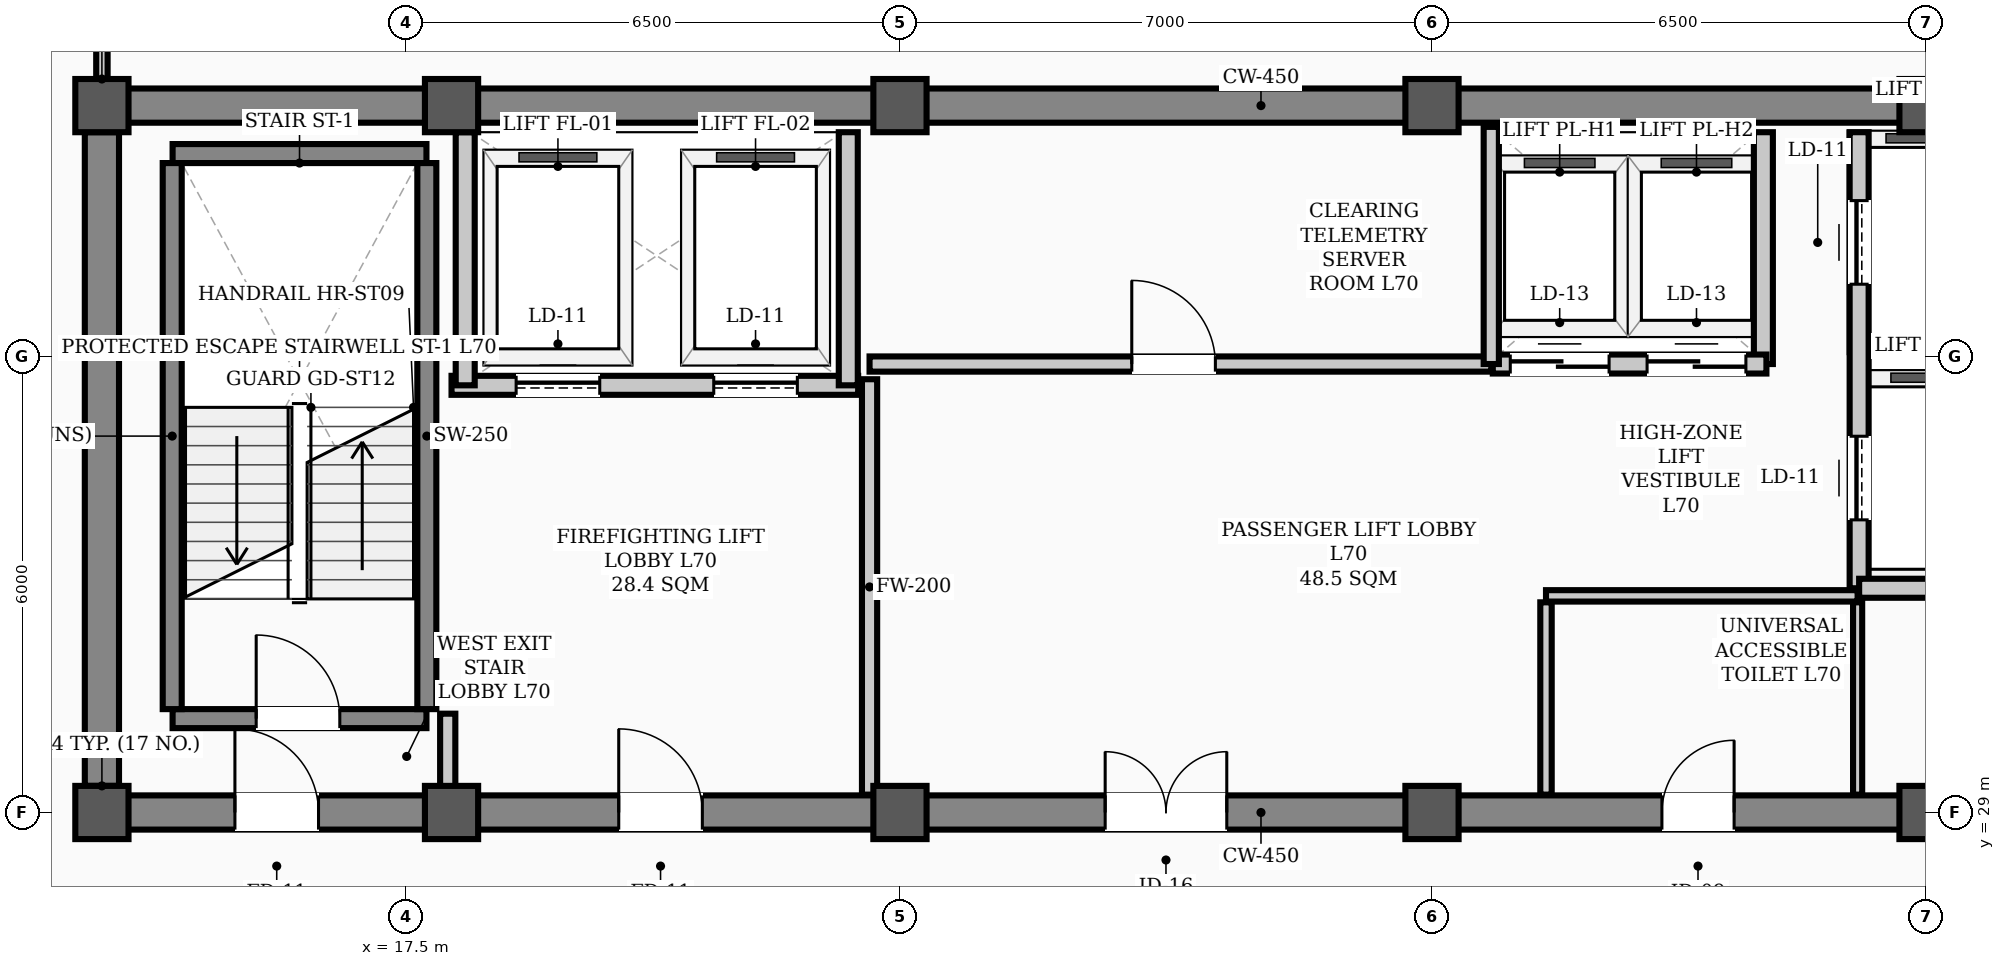
"""IFC4 building model, lengths in metres.
Left out: names, types, materials, properties, quantities, classifications, styles, units other than length and angle.
Written with IfcOpenShell. Run it as: python <this file> out.ifc"""

import sys

from ifc_helpers import new_model, si_unit, direction, frame, frame_2d, origin, origin_2d, place, context, subcontext, project, spatial, rectangle, hollow_rectangle, extrude, element, fill, save


model = new_model("IFC4")
c1 = context("Model", 3, precision=1e-05, world=origin(), true_north=direction((0.0, 1.0)))
c2 = subcontext(c1, "Body", "Model", "MODEL_VIEW")
j1 = project(units=[si_unit("LENGTHUNIT", "METRE"), si_unit("PLANEANGLEUNIT", "RADIAN")], contexts=[c1])
p1 = place(None, origin())
s1 = spatial("IfcSite", under=j1, at=p1, CompositionType="ELEMENT")
p2 = place(p1, origin())
s2 = spatial("IfcBuilding", under=s1, at=p2, CompositionType="ELEMENT")
p3 = place(p2, frame((0.0, 0.0, 281.3)))
s3 = spatial("IfcBuildingStorey", under=s2, at=p3, CompositionType="ELEMENT", Elevation=281.3)
for number, where, z_axis, x_axis in (
    (1, (13.5, 29.0, 0.0), (0.0, 0.0, 1.0), (1.0, 0.0, 0.0)),
    (2, (13.5, 38.3, 0.0), (0.0, 0.0, 1.0), (1.0, 0.0, 0.0)),
    (3, (18.1, 29.0, 0.0), (0.0, 0.0, 1.0), (1.0, 0.0, 0.0)),
    (4, (18.1, 38.3, 0.0), (0.0, 0.0, 1.0), (1.0, 0.0, 0.0)),
    (5, (24.0, 29.0, 0.0), (0.0, 0.0, 1.0), (1.0, 0.0, 0.0)),
    (6, (24.0, 38.3, 0.0), (0.0, 0.0, 1.0), (1.0, 0.0, 0.0)),
    (7, (31.0, 29.0, 0.0), (0.0, 0.0, 1.0), (1.0, 0.0, 0.0)),
    (8, (31.0, 38.3, 0.0), (0.0, 0.0, 1.0), (1.0, 0.0, 0.0)),
    (9, (37.5, 29.0, 0.0), (0.0, 0.0, 1.0), (1.0, 0.0, 0.0)),
    (10, (37.5, 38.3, 0.0), (0.0, 0.0, 1.0), (1.0, 0.0, 0.0)),
):
    element("IfcColumn", number, at=place(p3, frame(where, z_axis=z_axis, x_axis=x_axis)), inside=s3, PredefinedType="COLUMN", context=c2, shape_type="SweptSolid", body=[
        extrude(hollow_rectangle(XDim=0.7, YDim=0.7, WallThickness=0.028, InnerFilletRadius=0.014, OuterFilletRadius=0.042, at=origin_2d()), origin(), (0.0, 0.0, 1.0), 3.9),
    ])
p4 = place(p3, frame((13.5, 29.0, 0.0), z_axis=(0.0, 0.0, 1.0), x_axis=(1.0, 0.0, 0.0)))
e11 = element("IfcWall", 11, at=p4, inside=s3, PredefinedType="SHEAR", context=c2, shape_type="SweptSolid", body=[
    extrude(rectangle(XDim=30.5, YDim=0.45, at=frame_2d((15.25, 0.0))), origin(), (0.0, 0.0, 1.0), 3.72),
])
p5 = place(p4, frame((1.75, 0.0, 0.0)))
e12 = element("IfcOpeningElement", 12, at=p5, cuts=e11, PredefinedType="OPENING", context=c2, shape_type="SweptSolid", body=[
    extrude(rectangle(XDim=1.1, YDim=2.08, at=frame_2d((0.55, 1.04))), frame((0.0, 0.235, 0.0), z_axis=(0.0, -1.0, 0.0), x_axis=(1.0, 0.0, 0.0)), (0.0, 0.0, 1.0), 0.47),
])
p6 = place(p4, frame((26.7, 0.0, 0.0)))
e13 = element("IfcOpeningElement", 13, at=p6, cuts=e11, PredefinedType="OPENING", context=c2, shape_type="SweptSolid", body=[
    extrude(rectangle(XDim=1.1, YDim=2.08, at=frame_2d((0.55, 1.04))), frame((0.0, 0.235, 0.0), z_axis=(0.0, -1.0, 0.0), x_axis=(1.0, 0.0, 0.0)), (0.0, 0.0, 1.0), 0.47),
])
p7 = place(p4, frame((6.8, 0.0, 0.0)))
e14 = element("IfcOpeningElement", 14, at=p7, cuts=e11, PredefinedType="OPENING", context=c2, shape_type="SweptSolid", body=[
    extrude(rectangle(XDim=1.1, YDim=2.08, at=frame_2d((0.55, 1.04))), frame((0.0, 0.235, 0.0), z_axis=(0.0, -1.0, 0.0), x_axis=(1.0, 0.0, 0.0)), (0.0, 0.0, 1.0), 0.47),
])
p8 = place(p4, frame((13.2, 0.0, 0.0)))
e15 = element("IfcOpeningElement", 15, at=p8, cuts=e11, PredefinedType="OPENING", context=c2, shape_type="SweptSolid", body=[
    extrude(rectangle(XDim=1.6, YDim=2.08, at=frame_2d((0.8, 1.04))), frame((0.0, 0.235, 0.0), z_axis=(0.0, -1.0, 0.0), x_axis=(1.0, 0.0, 0.0)), (0.0, 0.0, 1.0), 0.47),
])
p9 = place(p4, frame((20.525, 0.0, 0.0)))
e16 = element("IfcOpeningElement", 16, at=p9, cuts=e11, PredefinedType="OPENING", context=c2, shape_type="SweptSolid", body=[
    extrude(rectangle(XDim=0.95, YDim=2.08, at=frame_2d((0.475, 1.04))), frame((0.0, 0.235, 0.0), z_axis=(0.0, -1.0, 0.0), x_axis=(1.0, 0.0, 0.0)), (0.0, 0.0, 1.0), 0.47),
])
p10 = place(p3, frame((13.5, 38.3, 0.0), z_axis=(0.0, 0.0, 1.0), x_axis=(1.0, 0.0, 0.0)))
e17 = element("IfcWall", 17, at=p10, inside=s3, PredefinedType="SHEAR", context=c2, shape_type="SweptSolid", body=[
    extrude(rectangle(XDim=30.5, YDim=0.45, at=frame_2d((15.25, 0.0))), origin(), (0.0, 0.0, 1.0), 3.72),
])
p11 = place(p3, frame((13.5, 29.35, 0.0), z_axis=(0.0, 0.0, 1.0), x_axis=(0.0, 1.0, 0.0)))
e18 = element("IfcWall", 18, at=p11, inside=s3, PredefinedType="SHEAR", context=c2, shape_type="SweptSolid", body=[
    extrude(rectangle(XDim=8.6, YDim=0.45, at=frame_2d((4.3, 0.0))), origin(), (0.0, 0.0, 1.0), 3.72),
])
p12 = place(p3, frame((14.43, 30.235, 0.0), z_axis=(0.0, 0.0, 1.0), x_axis=(1.0, 0.0, 0.0)))
e19 = element("IfcWall", 19, at=p12, inside=s3, PredefinedType="STANDARD", context=c2, shape_type="SweptSolid", body=[
    extrude(rectangle(XDim=3.34, YDim=0.25, at=frame_2d((1.67, 0.0))), origin(), (0.0, 0.0, 1.0), 3.72),
])
p13 = place(p12, frame((1.1, 0.0, 0.0)))
e20 = element("IfcOpeningElement", 20, at=p13, cuts=e19, PredefinedType="OPENING", context=c2, shape_type="SweptSolid", body=[
    extrude(rectangle(XDim=1.1, YDim=2.08, at=frame_2d((0.55, 1.04))), frame((0.0, 0.135, 0.0), z_axis=(0.0, -1.0, 0.0), x_axis=(1.0, 0.0, 0.0)), (0.0, 0.0, 1.0), 0.27),
])
p14 = place(p3, frame((14.43, 37.669, 0.0), z_axis=(0.0, 0.0, 1.0), x_axis=(1.0, 0.0, 0.0)))
e21 = element("IfcWall", 21, at=p14, inside=s3, PredefinedType="STANDARD", context=c2, shape_type="SweptSolid", body=[
    extrude(rectangle(XDim=3.34, YDim=0.25, at=frame_2d((1.67, 0.0))), origin(), (0.0, 0.0, 1.0), 3.72),
])
for number, where, z_axis, x_axis in (
    (22, (14.425, 30.36, 0.0), (0.0, 0.0, 1.0), (0.0, 1.0, 0.0)),
    (23, (17.775, 30.36, 0.0), (0.0, 0.0, 1.0), (0.0, 1.0, 0.0)),
):
    element("IfcWall", number, at=place(p3, frame(where, z_axis=z_axis, x_axis=x_axis)), inside=s3, PredefinedType="STANDARD", context=c2, shape_type="SweptSolid", body=[
        extrude(rectangle(XDim=7.184, YDim=0.25, at=frame_2d((3.592, 0.0))), origin(), (0.0, 0.0, 1.0), 3.72),
    ])
p15 = place(p3, frame((18.1, 34.62, 0.0), z_axis=(0.0, 0.0, 1.0), x_axis=(1.0, 0.0, 0.0)))
e24 = element("IfcWall", 24, at=p15, inside=s3, PredefinedType="STANDARD", context=c2, shape_type="SweptSolid", body=[
    extrude(rectangle(XDim=5.35, YDim=0.25, at=frame_2d((2.675, 0.0))), origin(), (0.0, 0.0, 1.0), 3.72),
])
p16 = place(p15, frame((0.85, 0.0, 0.0)))
e25 = element("IfcOpeningElement", 25, at=p16, cuts=e24, PredefinedType="OPENING", context=c2, shape_type="SweptSolid", body=[
    extrude(rectangle(XDim=1.1, YDim=2.08, at=frame_2d((0.55, 1.04))), frame((0.0, 0.135, 0.0), z_axis=(0.0, -1.0, 0.0), x_axis=(1.0, 0.0, 0.0)), (0.0, 0.0, 1.0), 0.27),
])
p17 = place(p15, frame((3.45, 0.0, 0.0)))
e26 = element("IfcOpeningElement", 26, at=p17, cuts=e24, PredefinedType="OPENING", context=c2, shape_type="SweptSolid", body=[
    extrude(rectangle(XDim=1.1, YDim=2.08, at=frame_2d((0.55, 1.04))), frame((0.0, 0.135, 0.0), z_axis=(0.0, -1.0, 0.0), x_axis=(1.0, 0.0, 0.0)), (0.0, 0.0, 1.0), 0.27),
])
p18 = place(p3, frame((36.62, 31.95, 0.0), z_axis=(0.0, 0.0, 1.0), x_axis=(0.0, 1.0, 0.0)))
e27 = element("IfcWall", 27, at=p18, inside=s3, PredefinedType="STANDARD", context=c2, shape_type="SweptSolid", body=[
    extrude(rectangle(XDim=6.0, YDim=0.25, at=frame_2d((3.0, 0.0))), origin(), (0.0, 0.0, 1.0), 3.4),
])
p19 = place(p18, frame((0.9, 0.0, 0.0)))
e28 = element("IfcOpeningElement", 28, at=p19, cuts=e27, PredefinedType="OPENING", context=c2, shape_type="SweptSolid", body=[
    extrude(rectangle(XDim=1.1, YDim=2.08, at=frame_2d((0.55, 1.04))), frame((0.0, 0.135, 0.0), z_axis=(0.0, -1.0, 0.0), x_axis=(1.0, 0.0, 0.0)), (0.0, 0.0, 1.0), 0.27),
])
p20 = place(p18, frame((4.0, 0.0, 0.0)))
e29 = element("IfcOpeningElement", 29, at=p20, cuts=e27, PredefinedType="OPENING", context=c2, shape_type="SweptSolid", body=[
    extrude(rectangle(XDim=1.1, YDim=2.08, at=frame_2d((0.55, 1.04))), frame((0.0, 0.135, 0.0), z_axis=(0.0, -1.0, 0.0), x_axis=(1.0, 0.0, 0.0)), (0.0, 0.0, 1.0), 0.27),
])
p21 = place(p3, frame((36.62, 31.95, 0.0), z_axis=(0.0, 0.0, 1.0), x_axis=(1.0, 0.0, 0.0)))
e30 = element("IfcWall", 30, at=p21, inside=s3, PredefinedType="STANDARD", context=c2, shape_type="SweptSolid", body=[
    extrude(rectangle(XDim=1.9, YDim=0.25, at=frame_2d((0.95, 0.0))), origin(), (0.0, 0.0, 1.0), 3.48),
])
for number, where, z_axis, x_axis in (
    (31, (18.28, 34.62, 0.0), (0.0, 0.0, 1.0), (0.0, 1.0, 0.0)),
    (32, (23.32, 34.62, 0.0), (0.0, 0.0, 1.0), (0.0, 1.0, 0.0)),
):
    element("IfcWall", number, at=place(p3, frame(where, z_axis=z_axis, x_axis=x_axis)), inside=s3, PredefinedType="STANDARD", context=c2, shape_type="SweptSolid", body=[
        extrude(rectangle(XDim=3.33, YDim=0.25, at=frame_2d((1.665, 0.0))), origin(), (0.0, 0.0, 1.0), 3.72),
    ])
p22 = place(p3, frame((35.36, 34.9, 0.0), z_axis=(0.0, 0.0, 1.0), x_axis=(0.0, 1.0, 0.0)))
e33 = element("IfcWall", 33, at=p22, inside=s3, PredefinedType="STANDARD", context=c2, shape_type="SweptSolid", body=[
    extrude(rectangle(XDim=3.05, YDim=0.25, at=frame_2d((1.525, 0.0))), origin(), (0.0, 0.0, 1.0), 3.4),
])
p23 = place(p3, frame((31.8, 34.9, 0.0), z_axis=(0.0, 0.0, 1.0), x_axis=(1.0, 0.0, 0.0)))
e34 = element("IfcWall", 34, at=p23, inside=s3, PredefinedType="STANDARD", context=c2, shape_type="SweptSolid", body=[
    extrude(rectangle(XDim=3.6, YDim=0.25, at=frame_2d((1.8, 0.0))), origin(), (0.0, 0.0, 1.0), 3.72),
])
p24 = place(p23, frame((0.23, 0.0, 0.0)))
e35 = element("IfcOpeningElement", 35, at=p24, cuts=e34, PredefinedType="OPENING", context=c2, shape_type="SweptSolid", body=[
    extrude(rectangle(XDim=1.3, YDim=2.08, at=frame_2d((0.65, 1.04))), frame((0.0, 0.135, 0.0), z_axis=(0.0, -1.0, 0.0), x_axis=(1.0, 0.0, 0.0)), (0.0, 0.0, 1.0), 0.27),
])
p25 = place(p23, frame((2.03, 0.0, 0.0)))
e36 = element("IfcOpeningElement", 36, at=p25, cuts=e34, PredefinedType="OPENING", context=c2, shape_type="SweptSolid", body=[
    extrude(rectangle(XDim=1.3, YDim=2.08, at=frame_2d((0.65, 1.04))), frame((0.0, 0.135, 0.0), z_axis=(0.0, -1.0, 0.0), x_axis=(1.0, 0.0, 0.0)), (0.0, 0.0, 1.0), 0.27),
])
p26 = place(p3, frame((23.6, 34.9, 0.0), z_axis=(0.0, 0.0, 1.0), x_axis=(1.0, 0.0, 0.0)))
e37 = element("IfcWall", 37, at=p26, inside=s3, PredefinedType="STANDARD", context=c2, shape_type="SweptSolid", body=[
    extrude(rectangle(XDim=8.18, YDim=0.2, at=frame_2d((4.09, 0.0))), origin(), (0.0, 0.0, 1.0), 3.72),
])
p27 = place(p26, frame((3.45, 0.0, 0.0)))
e38 = element("IfcOpeningElement", 38, at=p27, cuts=e37, PredefinedType="OPENING", context=c2, shape_type="SweptSolid", body=[
    extrude(rectangle(XDim=1.1, YDim=2.08, at=frame_2d((0.55, 1.04))), frame((0.0, 0.11, 0.0), z_axis=(0.0, -1.0, 0.0), x_axis=(1.0, 0.0, 0.0)), (0.0, 0.0, 1.0), 0.22),
])
p28 = place(p3, frame((32.5, 31.85, 0.0), z_axis=(0.0, 0.0, 1.0), x_axis=(1.0, 0.0, 0.0)))
e39 = element("IfcWall", 39, at=p28, inside=s3, PredefinedType="PARTITIONING", context=c2, shape_type="SweptSolid", body=[
    extrude(rectangle(XDim=4.1, YDim=0.15, at=frame_2d((2.05, 0.0))), origin(), (0.0, 0.0, 1.0), 3.72),
])
p29 = place(p3, frame((18.05, 29.235, 0.0), z_axis=(0.0, 0.0, 1.0), x_axis=(0.0, 1.0, 0.0)))
e40 = element("IfcWall", 40, at=p29, inside=s3, PredefinedType="STANDARD", context=c2, shape_type="SweptSolid", body=[
    extrude(rectangle(XDim=1.065, YDim=0.2, at=frame_2d((0.532, 0.0))), origin(), (0.0, 0.0, 1.0), 3.72),
])
p30 = place(p3, frame((23.6, 29.235, 0.0), z_axis=(0.0, 0.0, 1.0), x_axis=(0.0, 1.0, 0.0)))
e41 = element("IfcWall", 41, at=p30, inside=s3, PredefinedType="STANDARD", context=c2, shape_type="SweptSolid", body=[
    extrude(rectangle(XDim=5.465, YDim=0.2, at=frame_2d((2.732, 0.0))), origin(), (0.0, 0.0, 1.0), 3.2),
])
p31 = place(p3, frame((32.5, 29.235, 0.0), z_axis=(0.0, 0.0, 1.0), x_axis=(0.0, 1.0, 0.0)))
e42 = element("IfcWall", 42, at=p31, inside=s3, PredefinedType="PARTITIONING", context=c2, shape_type="SweptSolid", body=[
    extrude(rectangle(XDim=2.53, YDim=0.15, at=frame_2d((1.265, 0.0))), origin(), (0.0, 0.0, 1.0), 3.4),
])
p32 = place(p3, frame((36.6, 29.235, 0.0), z_axis=(0.0, 0.0, 1.0), x_axis=(0.0, 1.0, 0.0)))
e43 = element("IfcWall", 43, at=p32, inside=s3, PredefinedType="PARTITIONING", context=c2, shape_type="SweptSolid", body=[
    extrude(rectangle(XDim=2.53, YDim=0.12, at=frame_2d((1.265, 0.0))), origin(), (0.0, 0.0, 1.0), 3.4),
])
p33 = place(p3, frame((13.5, 38.535, 0.0), z_axis=(0.0, 0.0, 1.0), x_axis=(0.0, 1.0, 0.0)))
e44 = element("IfcWall", 44, at=p33, inside=s3, PredefinedType="PARTITIONING", context=c2, shape_type="SweptSolid", body=[
    extrude(rectangle(XDim=2.405, YDim=0.15, at=frame_2d((1.203, 0.0))), origin(), (0.0, 0.0, 1.0), 3.72),
])
p34 = place(p3, frame((31.78, 34.9, 0.0), z_axis=(0.0, 0.0, 1.0), x_axis=(0.0, 1.0, 0.0)))
e45 = element("IfcWall", 45, at=p34, inside=s3, PredefinedType="STANDARD", context=c2, shape_type="SweptSolid", body=[
    extrude(rectangle(XDim=3.12, YDim=0.2, at=frame_2d((1.56, 0.0))), origin(), (0.0, 0.0, 1.0), 3.4),
])
p35 = place(p13, origin())
e46 = element("IfcDoor", 46, at=p35, inside=s3, OperationType="SINGLE_SWING_LEFT", PredefinedType="DOOR", context=c2, shape_type="SweptSolid", body=[
    extrude(rectangle(XDim=1.1, YDim=2.08, at=frame_2d((0.55, 1.04))), frame((0.0, 0.025, 0.0), z_axis=(0.0, -1.0, 0.0), x_axis=(1.0, 0.0, 0.0)), (0.0, 0.0, 1.0), 0.05),
])
fill(e20, e46)
p36 = place(p5, origin())
e47 = element("IfcDoor", 47, at=p36, inside=s3, OperationType="SINGLE_SWING_LEFT", PredefinedType="DOOR", context=c2, shape_type="SweptSolid", body=[
    extrude(rectangle(XDim=1.1, YDim=2.08, at=frame_2d((0.55, 1.04))), frame((0.0, 0.025, 0.0), z_axis=(0.0, -1.0, 0.0), x_axis=(1.0, 0.0, 0.0)), (0.0, 0.0, 1.0), 0.05),
])
fill(e12, e47)
p37 = place(p7, origin())
e48 = element("IfcDoor", 48, at=p37, inside=s3, OperationType="SINGLE_SWING_LEFT", PredefinedType="DOOR", context=c2, shape_type="SweptSolid", body=[
    extrude(rectangle(XDim=1.1, YDim=2.08, at=frame_2d((0.55, 1.04))), frame((0.0, 0.025, 0.0), z_axis=(0.0, -1.0, 0.0), x_axis=(1.0, 0.0, 0.0)), (0.0, 0.0, 1.0), 0.05),
])
fill(e14, e48)
p38 = place(p8, origin())
e49 = element("IfcDoor", 49, at=p38, inside=s3, OperationType="DOUBLE_DOOR_SINGLE_SWING", PredefinedType="DOOR", context=c2, shape_type="SweptSolid", body=[
    extrude(rectangle(XDim=1.6, YDim=2.08, at=frame_2d((0.8, 1.04))), frame((0.0, 0.025, 0.0), z_axis=(0.0, -1.0, 0.0), x_axis=(1.0, 0.0, 0.0)), (0.0, 0.0, 1.0), 0.05),
])
fill(e15, e49)
p39 = place(p27, origin())
e50 = element("IfcDoor", 50, at=p39, inside=s3, OperationType="SINGLE_SWING_LEFT", PredefinedType="DOOR", context=c2, shape_type="SweptSolid", body=[
    extrude(rectangle(XDim=1.1, YDim=2.08, at=frame_2d((0.55, 1.04))), frame((0.0, 0.025, 0.0), z_axis=(0.0, -1.0, 0.0), x_axis=(1.0, 0.0, 0.0)), (0.0, 0.0, 1.0), 0.05),
])
fill(e38, e50)
p40 = place(p9, origin())
e51 = element("IfcDoor", 51, at=p40, inside=s3, OperationType="SINGLE_SWING_RIGHT", PredefinedType="DOOR", context=c2, shape_type="SweptSolid", body=[
    extrude(rectangle(XDim=0.95, YDim=2.08, at=frame_2d((0.475, 1.04))), frame((0.0, 0.025, 0.0), z_axis=(0.0, -1.0, 0.0), x_axis=(1.0, 0.0, 0.0)), (0.0, 0.0, 1.0), 0.05),
])
fill(e16, e51)
p41 = place(p16, origin())
e52 = element("IfcDoor", 52, at=p41, inside=s3, OperationType="SLIDING_TO_LEFT", PredefinedType="DOOR", context=c2, shape_type="SweptSolid", body=[
    extrude(rectangle(XDim=1.1, YDim=2.08, at=frame_2d((0.55, 1.04))), frame((0.0, 0.025, 0.0), z_axis=(0.0, -1.0, 0.0), x_axis=(1.0, 0.0, 0.0)), (0.0, 0.0, 1.0), 0.05),
])
fill(e25, e52)
p42 = place(p17, origin())
e53 = element("IfcDoor", 53, at=p42, inside=s3, OperationType="SLIDING_TO_LEFT", PredefinedType="DOOR", context=c2, shape_type="SweptSolid", body=[
    extrude(rectangle(XDim=1.1, YDim=2.08, at=frame_2d((0.55, 1.04))), frame((0.0, 0.025, 0.0), z_axis=(0.0, -1.0, 0.0), x_axis=(1.0, 0.0, 0.0)), (0.0, 0.0, 1.0), 0.05),
])
fill(e26, e53)
p43 = place(p19, origin())
e54 = element("IfcDoor", 54, at=p43, inside=s3, OperationType="SLIDING_TO_LEFT", PredefinedType="DOOR", context=c2, shape_type="SweptSolid", body=[
    extrude(rectangle(XDim=1.1, YDim=2.08, at=frame_2d((0.55, 1.04))), frame((0.0, 0.025, 0.0), z_axis=(0.0, -1.0, 0.0), x_axis=(1.0, 0.0, 0.0)), (0.0, 0.0, 1.0), 0.05),
])
fill(e28, e54)
p44 = place(p20, origin())
e55 = element("IfcDoor", 55, at=p44, inside=s3, OperationType="SLIDING_TO_LEFT", PredefinedType="DOOR", context=c2, shape_type="SweptSolid", body=[
    extrude(rectangle(XDim=1.1, YDim=2.08, at=frame_2d((0.55, 1.04))), frame((0.0, 0.025, 0.0), z_axis=(0.0, -1.0, 0.0), x_axis=(1.0, 0.0, 0.0)), (0.0, 0.0, 1.0), 0.05),
])
fill(e29, e55)
p45 = place(p24, origin())
e56 = element("IfcDoor", 56, at=p45, inside=s3, OperationType="DOUBLE_DOOR_SLIDING", PredefinedType="DOOR", context=c2, shape_type="SweptSolid", body=[
    extrude(rectangle(XDim=1.3, YDim=2.08, at=frame_2d((0.65, 1.04))), frame((0.0, 0.025, 0.0), z_axis=(0.0, -1.0, 0.0), x_axis=(1.0, 0.0, 0.0)), (0.0, 0.0, 1.0), 0.05),
])
fill(e35, e56)
p46 = place(p25, origin())
e57 = element("IfcDoor", 57, at=p46, inside=s3, OperationType="DOUBLE_DOOR_SLIDING", PredefinedType="DOOR", context=c2, shape_type="SweptSolid", body=[
    extrude(rectangle(XDim=1.3, YDim=2.08, at=frame_2d((0.65, 1.04))), frame((0.0, 0.025, 0.0), z_axis=(0.0, -1.0, 0.0), x_axis=(1.0, 0.0, 0.0)), (0.0, 0.0, 1.0), 0.05),
])
fill(e36, e57)
save(model, sys.argv[1])
